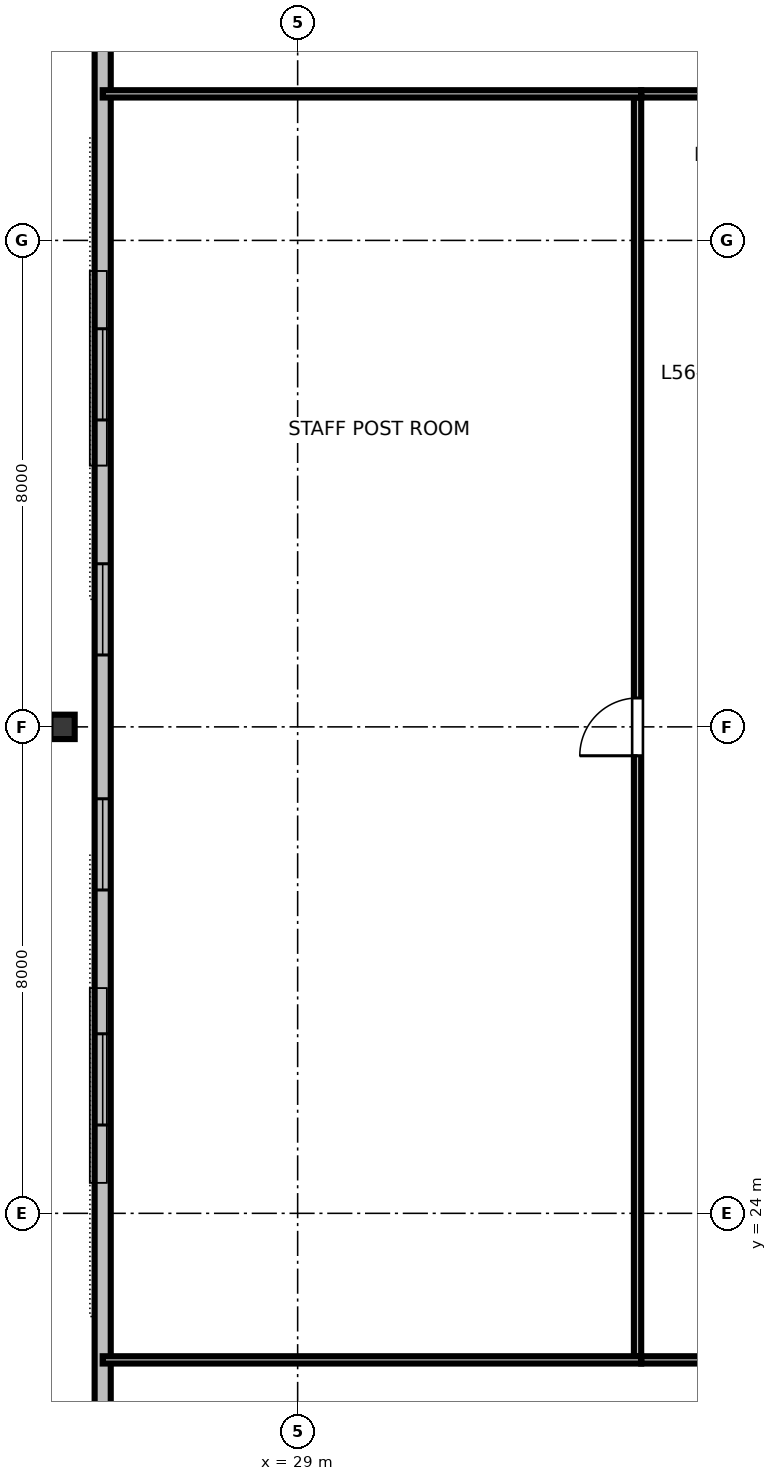
"""IFC4 building model, lengths in metres.
Left out: names, types, materials, properties, quantities, classifications, styles, units other than length and angle.
Written with IfcOpenShell. Run it as: python <this file> out.ifc"""

import sys

from ifc_helpers import new_model, si_unit, direction, frame, frame_2d, origin, origin_2d, place, context, subcontext, project, spatial, rectangle, i_section, extrude, element, fill, save


model = new_model("IFC4")
c1 = context("Model", 3, precision=1e-05, world=origin(), true_north=direction((0.0, 1.0)))
c2 = subcontext(c1, "Body", "Model", "MODEL_VIEW")
j1 = project(units=[si_unit("LENGTHUNIT", "METRE"), si_unit("PLANEANGLEUNIT", "RADIAN")], contexts=[c1])
p1 = place(None, origin())
s1 = spatial("IfcSite", under=j1, at=p1, CompositionType="ELEMENT")
p2 = place(p1, origin())
s2 = spatial("IfcBuilding", under=s1, at=p2, CompositionType="ELEMENT")
p3 = place(p2, frame((0.0, 0.0, 213.0)))
s3 = spatial("IfcBuildingStorey", under=s2, at=p3, CompositionType="ELEMENT", Elevation=213.0)
p4 = place(p3, frame((25.134, 32.0, 0.0), z_axis=(0.0, 0.0, 1.0), x_axis=(0.0, 1.0, 0.0)))
e1 = element("IfcColumn", 1, at=p4, inside=s3, PredefinedType="COLUMN", context=c2, shape_type="SweptSolid", body=[
    extrude(i_section(OverallWidth=0.401, OverallDepth=0.399, WebThickness=0.025, FlangeThickness=0.04, FilletRadius=0.025, at=origin_2d()), origin(), (0.0, 0.0, 1.0), 3.373),
])
p5 = place(p3, frame((25.794, 44.695, 0.0), z_axis=(0.0, 0.0, 1.0), x_axis=(0.0, -1.0, 0.0)))
e2 = element("IfcWall", 2, at=p5, inside=s3, PredefinedType="STANDARD", context=c2, shape_type="SweptSolid", body=[
    extrude(rectangle(XDim=25.389, YDim=0.265, at=frame_2d((12.695, 0.0))), origin(), (0.0, 0.0, 1.0), 3.375),
])
p6 = place(p5, frame((6.147, 0.0, 0.85)))
e3 = element("IfcOpeningElement", 3, at=p6, cuts=e2, PredefinedType="OPENING", context=c2, shape_type="SweptSolid", body=[
    extrude(rectangle(XDim=1.5, YDim=1.85, at=frame_2d((0.75, 0.925))), frame((0.0, 0.142, 0.0), z_axis=(0.0, -1.0, 0.0), x_axis=(1.0, 0.0, 0.0)), (0.0, 0.0, 1.0), 0.285),
])
p7 = place(p5, frame((10.012, 0.0, 0.85)))
e4 = element("IfcOpeningElement", 4, at=p7, cuts=e2, PredefinedType="OPENING", context=c2, shape_type="SweptSolid", body=[
    extrude(rectangle(XDim=1.5, YDim=1.85, at=frame_2d((0.75, 0.925))), frame((0.0, 0.142, 0.0), z_axis=(0.0, -1.0, 0.0), x_axis=(1.0, 0.0, 0.0)), (0.0, 0.0, 1.0), 0.285),
])
p8 = place(p5, frame((13.877, 0.0, 0.85)))
e5 = element("IfcOpeningElement", 5, at=p8, cuts=e2, PredefinedType="OPENING", context=c2, shape_type="SweptSolid", body=[
    extrude(rectangle(XDim=1.5, YDim=1.85, at=frame_2d((0.75, 0.925))), frame((0.0, 0.142, 0.0), z_axis=(0.0, -1.0, 0.0), x_axis=(1.0, 0.0, 0.0)), (0.0, 0.0, 1.0), 0.285),
])
p9 = place(p5, frame((17.742, 0.0, 0.85)))
e6 = element("IfcOpeningElement", 6, at=p9, cuts=e2, PredefinedType="OPENING", context=c2, shape_type="SweptSolid", body=[
    extrude(rectangle(XDim=1.5, YDim=1.85, at=frame_2d((0.75, 0.925))), frame((0.0, 0.142, 0.0), z_axis=(0.0, -1.0, 0.0), x_axis=(1.0, 0.0, 0.0)), (0.0, 0.0, 1.0), 0.285),
])
p10 = place(p3, frame((34.65, 21.59, 0.0), z_axis=(0.0, 0.0, 1.0), x_axis=(1.0, 0.0, 0.0)))
e7 = element("IfcWall", 7, at=p10, inside=s3, PredefinedType="PARTITIONING", context=c2, shape_type="SweptSolid", body=[
    extrude(rectangle(XDim=10.33, YDim=0.12, at=frame_2d((5.165, 0.0))), origin(), (0.0, 0.0, 1.0), 2.655),
])
p11 = place(p10, frame((2.69, 0.0, 0.0)))
e8 = element("IfcOpeningElement", 8, at=p11, cuts=e7, PredefinedType="OPENING", context=c2, shape_type="SweptSolid", body=[
    extrude(rectangle(XDim=0.95, YDim=2.15, at=frame_2d((0.475, 1.075))), frame((0.0, 0.07, 0.0), z_axis=(0.0, -1.0, 0.0), x_axis=(1.0, 0.0, 0.0)), (0.0, 0.0, 1.0), 0.14),
])
p12 = place(p10, frame((7.393, 0.0, 0.0)))
e9 = element("IfcOpeningElement", 9, at=p12, cuts=e7, PredefinedType="OPENING", context=c2, shape_type="SweptSolid", body=[
    extrude(rectangle(XDim=0.95, YDim=2.15, at=frame_2d((0.475, 1.075))), frame((0.0, 0.07, 0.0), z_axis=(0.0, -1.0, 0.0), x_axis=(1.0, 0.0, 0.0)), (0.0, 0.0, 1.0), 0.14),
])
p13 = place(p3, frame((34.65, 42.41, 0.0), z_axis=(0.0, 0.0, 1.0), x_axis=(1.0, 0.0, 0.0)))
e10 = element("IfcWall", 10, at=p13, inside=s3, PredefinedType="PARTITIONING", context=c2, shape_type="SweptSolid", body=[
    extrude(rectangle(XDim=10.33, YDim=0.12, at=frame_2d((5.165, 0.0))), origin(), (0.0, 0.0, 1.0), 2.655),
])
p14 = place(p13, frame((3.674, 0.0, 0.0)))
e11 = element("IfcOpeningElement", 11, at=p14, cuts=e10, PredefinedType="OPENING", context=c2, shape_type="SweptSolid", body=[
    extrude(rectangle(XDim=0.95, YDim=2.15, at=frame_2d((0.475, 1.075))), frame((0.0, 0.07, 0.0), z_axis=(0.0, -1.0, 0.0), x_axis=(1.0, 0.0, 0.0)), (0.0, 0.0, 1.0), 0.14),
])
p15 = place(p13, frame((8.769, 0.0, 0.0)))
e12 = element("IfcOpeningElement", 12, at=p15, cuts=e10, PredefinedType="OPENING", context=c2, shape_type="SweptSolid", body=[
    extrude(rectangle(XDim=0.95, YDim=2.15, at=frame_2d((0.475, 1.075))), frame((0.0, 0.07, 0.0), z_axis=(0.0, -1.0, 0.0), x_axis=(1.0, 0.0, 0.0)), (0.0, 0.0, 1.0), 0.14),
])
p16 = place(p3, frame((34.59, 21.65, 0.0), z_axis=(0.0, 0.0, 1.0), x_axis=(0.0, 1.0, 0.0)))
e13 = element("IfcWall", 13, at=p16, inside=s3, PredefinedType="PARTITIONING", context=c2, shape_type="SweptSolid", body=[
    extrude(rectangle(XDim=20.7, YDim=0.12, at=frame_2d((10.35, 0.0))), origin(), (0.0, 0.0, 1.0), 2.655),
])
p17 = place(p16, frame((9.875, 0.0, 0.0)))
e14 = element("IfcOpeningElement", 14, at=p17, cuts=e13, PredefinedType="OPENING", context=c2, shape_type="SweptSolid", body=[
    extrude(rectangle(XDim=0.95, YDim=2.15, at=frame_2d((0.475, 1.075))), frame((0.0, 0.07, 0.0), z_axis=(0.0, -1.0, 0.0), x_axis=(1.0, 0.0, 0.0)), (0.0, 0.0, 1.0), 0.14),
])
for number, where, z_axis, x_axis in (
    (15, (34.65, 21.59, 0.0), (0.0, 0.0, 1.0), (-1.0, 0.0, 0.0)),
    (16, (34.65, 42.41, 0.0), (0.0, 0.0, 1.0), (-1.0, 0.0, 0.0)),
):
    element("IfcWall", number, at=place(p3, frame(where, z_axis=z_axis, x_axis=x_axis)), inside=s3, PredefinedType="PARTITIONING", context=c2, shape_type="SweptSolid", body=[
        extrude(rectangle(XDim=8.856, YDim=0.12, at=frame_2d((4.428, 0.0))), origin(), (0.0, 0.0, 1.0), 2.655),
    ])
p18 = place(p6, origin())
e17 = element("IfcWindow", 17, at=p18, inside=s3, PartitioningType="SINGLE_PANEL", PredefinedType="WINDOW", context=c2, shape_type="SweptSolid", body=[
    extrude(rectangle(XDim=1.5, YDim=1.85, at=frame_2d((0.75, 0.925))), frame((0.0, 0.03, 0.0), z_axis=(0.0, -1.0, 0.0), x_axis=(1.0, 0.0, 0.0)), (0.0, 0.0, 1.0), 0.06),
])
fill(e3, e17)
p19 = place(p7, origin())
e18 = element("IfcWindow", 18, at=p19, inside=s3, PartitioningType="SINGLE_PANEL", PredefinedType="WINDOW", context=c2, shape_type="SweptSolid", body=[
    extrude(rectangle(XDim=1.5, YDim=1.85, at=frame_2d((0.75, 0.925))), frame((0.0, 0.03, 0.0), z_axis=(0.0, -1.0, 0.0), x_axis=(1.0, 0.0, 0.0)), (0.0, 0.0, 1.0), 0.06),
])
fill(e4, e18)
p20 = place(p8, origin())
e19 = element("IfcWindow", 19, at=p20, inside=s3, PartitioningType="SINGLE_PANEL", PredefinedType="WINDOW", context=c2, shape_type="SweptSolid", body=[
    extrude(rectangle(XDim=1.5, YDim=1.85, at=frame_2d((0.75, 0.925))), frame((0.0, 0.03, 0.0), z_axis=(0.0, -1.0, 0.0), x_axis=(1.0, 0.0, 0.0)), (0.0, 0.0, 1.0), 0.06),
])
fill(e5, e19)
p21 = place(p9, origin())
e20 = element("IfcWindow", 20, at=p21, inside=s3, PartitioningType="SINGLE_PANEL", PredefinedType="WINDOW", context=c2, shape_type="SweptSolid", body=[
    extrude(rectangle(XDim=1.5, YDim=1.85, at=frame_2d((0.75, 0.925))), frame((0.0, 0.03, 0.0), z_axis=(0.0, -1.0, 0.0), x_axis=(1.0, 0.0, 0.0)), (0.0, 0.0, 1.0), 0.06),
])
fill(e6, e20)
p22 = place(p17, origin())
e21 = element("IfcDoor", 21, at=p22, inside=s3, OperationType="SINGLE_SWING_LEFT", PredefinedType="DOOR", context=c2, shape_type="SweptSolid", body=[
    extrude(rectangle(XDim=0.95, YDim=2.15, at=frame_2d((0.475, 1.075))), frame((0.0, 0.025, 0.0), z_axis=(0.0, -1.0, 0.0), x_axis=(1.0, 0.0, 0.0)), (0.0, 0.0, 1.0), 0.05),
])
fill(e14, e21)
save(model, sys.argv[1])
